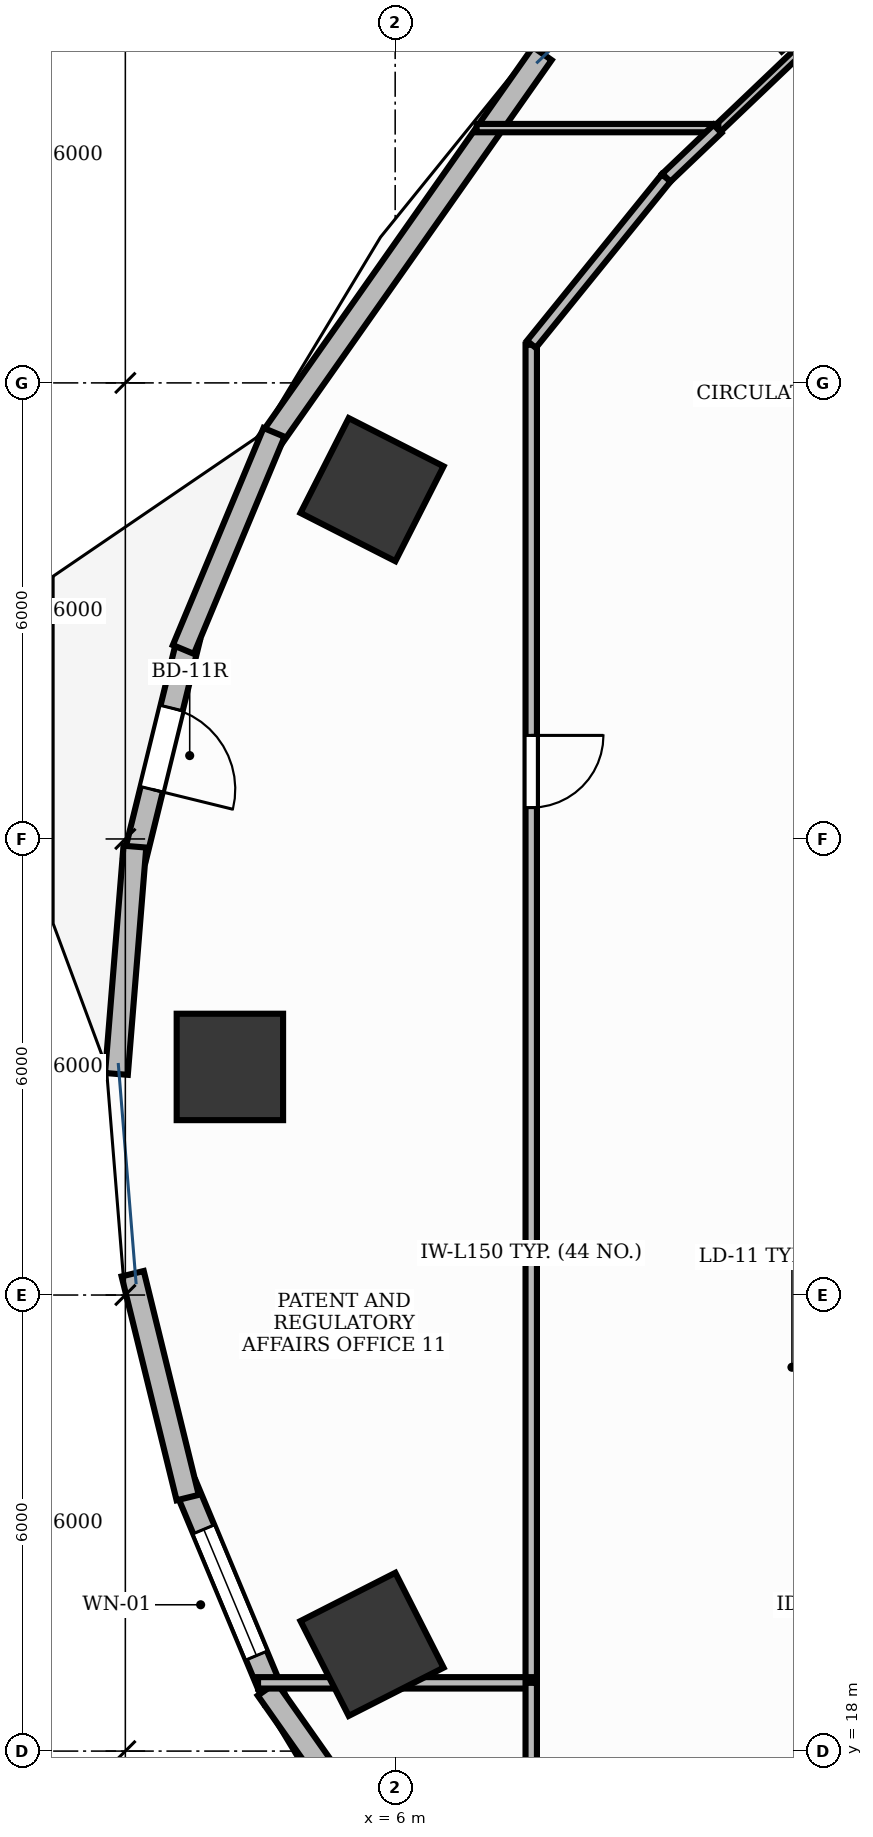
"""IFC4 building model, lengths in metres.
Left out: names, types, materials, properties, quantities, classifications, styles, units other than length and angle.
Written with IfcOpenShell. Run it as: python <this file> out.ifc"""

import sys

from ifc_helpers import new_model, si_unit, direction, frame, frame_2d, origin, origin_2d, place, context, subcontext, project, spatial, rectangle, extrude, element, fill, save


model = new_model("IFC4")
c1 = context("Model", 3, precision=1e-05, world=origin(), true_north=direction((0.0, 1.0)))
c2 = subcontext(c1, "Body", "Model", "MODEL_VIEW")
j1 = project(units=[si_unit("LENGTHUNIT", "METRE"), si_unit("PLANEANGLEUNIT", "RADIAN")], contexts=[c1])
p1 = place(None, origin())
s1 = spatial("IfcSite", under=j1, at=p1, CompositionType="ELEMENT")
p2 = place(p1, origin())
s2 = spatial("IfcBuilding", under=s1, at=p2, CompositionType="ELEMENT")
p3 = place(p2, frame((0.0, 0.0, 51.0)))
s3 = spatial("IfcBuildingStorey", under=s2, at=p3, CompositionType="ELEMENT", Elevation=51.0)
for number, where, z_axis, x_axis in (
    (1, (5.696, 34.596, -0.0), (0.0, 0.0, 1.0), (0.453, 0.891, 0.0)),
    (2, (3.825, 27.001, -0.0), (0.0, 0.0, 1.0), (0.0, 1.0, 0.0)),
    (3, (5.696, 19.404, -0.0), (0.0, 0.0, 1.0), (-0.453, 0.891, 0.0)),
):
    element("IfcColumn", number, at=place(p3, frame(where, z_axis=z_axis, x_axis=x_axis)), inside=s3, PredefinedType="COLUMN", context=c2, shape_type="SweptSolid", body=[
        extrude(rectangle(XDim=1.4, YDim=1.4, at=origin_2d()), origin(), (0.0, 0.0, 1.0), 3.901),
    ])
p4 = place(p3, frame((3.285, 32.641, 0.0), z_axis=(0.0, 0.0, 1.0), x_axis=(-0.238522035896, -0.971137085273, 0.0)))
e4 = element("IfcWall", 4, at=p4, inside=s3, PredefinedType="STANDARD", context=c2, shape_type="SweptSolid", body=[
    extrude(rectangle(XDim=2.993, YDim=0.3, at=frame_2d((1.497, 0.0))), origin(), (0.0, 0.0, 1.0), 3.9),
])
p5 = place(p4, frame((0.946, 0.0, 0.0)))
e5 = element("IfcOpeningElement", 5, at=p5, cuts=e4, PredefinedType="OPENING", context=c2, shape_type="SweptSolid", body=[
    extrude(rectangle(XDim=1.1, YDim=2.15, at=frame_2d((0.55, 1.075))), frame((0.0, 0.165, 0.0), z_axis=(0.0, -1.0, 0.0), x_axis=(1.0, 0.0, 0.0)), (0.0, 0.0, 1.0), 0.33),
])
p6 = place(p3, frame((3.24, 21.497, 0.0), z_axis=(0.0, 0.0, 1.0), x_axis=(0.385358473275, -0.92276695166, 0.0)))
e6 = element("IfcWall", 6, at=p6, inside=s3, PredefinedType="STANDARD", context=c2, shape_type="SweptSolid", body=[
    extrude(rectangle(XDim=3.056, YDim=0.3, at=frame_2d((1.528, 0.0))), origin(), (0.0, 0.0, 1.0), 3.47),
])
p7 = place(p6, frame((0.628, 0.0, 0.9)))
e7 = element("IfcOpeningElement", 7, at=p7, cuts=e6, PredefinedType="OPENING", context=c2, shape_type="SweptSolid", body=[
    extrude(rectangle(XDim=1.8, YDim=2.1, at=frame_2d((0.9, 1.05))), frame((0.0, 0.165, 0.0), z_axis=(0.0, -1.0, 0.0), x_axis=(1.0, 0.0, 0.0)), (0.0, 0.0, 1.0), 0.33),
])
p8 = place(p3, frame((7.936, 40.333, 0.0), z_axis=(0.0, 0.0, 1.0), x_axis=(-0.575165804445, -0.818036855769, 0.0)))
e8 = element("IfcWall", 8, at=p8, inside=s3, PredefinedType="STANDARD", context=c2, shape_type="SweptSolid", body=[
    extrude(rectangle(XDim=6.296, YDim=0.3, at=frame_2d((3.148, 0.0))), origin(), (0.0, 0.0, 1.0), 3.9),
])
p9 = place(p3, frame((4.406, 35.349, 0.0), z_axis=(0.0, 0.0, 1.0), x_axis=(-0.38535448421, -0.922768617531, 0.0)))
e9 = element("IfcWall", 9, at=p9, inside=s3, PredefinedType="STANDARD", context=c2, shape_type="SweptSolid", body=[
    extrude(rectangle(XDim=3.095, YDim=0.3, at=frame_2d((1.548, 0.0))), origin(), (0.0, 0.0, 1.0), 3.9),
])
p10 = place(p3, frame((2.576, 29.899, 0.0), z_axis=(0.0, 0.0, 1.0), x_axis=(-0.080890160317, -0.996723021689, 0.0)))
e10 = element("IfcWall", 10, at=p10, inside=s3, PredefinedType="STANDARD", context=c2, shape_type="SweptSolid", body=[
    extrude(rectangle(XDim=3.0, YDim=0.3, at=frame_2d((1.5, 0.0))), origin(), (0.0, 0.0, 1.0), 3.9),
])
p11 = place(p3, frame((2.546, 24.281, 0.0), z_axis=(0.0, 0.0, 1.0), x_axis=(0.23859399274, -0.971119409047, 0.0)))
e11 = element("IfcWall", 11, at=p11, inside=s3, PredefinedType="STANDARD", context=c2, shape_type="SweptSolid", body=[
    extrude(rectangle(XDim=3.033, YDim=0.3, at=frame_2d((1.517, 0.0))), origin(), (0.0, 0.0, 1.0), 3.47),
])
p12 = place(p3, frame((4.315, 18.817, 0.0), z_axis=(0.0, 0.0, 1.0), x_axis=(0.575165804445, -0.818036855769, 0.0)))
e12 = element("IfcWall", 12, at=p12, inside=s3, PredefinedType="STANDARD", context=c2, shape_type="SweptSolid", body=[
    extrude(rectangle(XDim=6.296, YDim=0.3, at=frame_2d((3.148, 0.0))), origin(), (0.0, 0.0, 1.0), 3.9),
])
p13 = place(p3, frame((7.79, 36.501, 0.0), z_axis=(0.0, 0.0, 1.0), x_axis=(0.0, -1.0, 0.0)))
e13 = element("IfcWall", 13, at=p13, inside=s3, PredefinedType="PARTITIONING", context=c2, shape_type="SweptSolid", body=[
    extrude(rectangle(XDim=17.593, YDim=0.15, at=frame_2d((8.797, 0.0))), origin(), (0.0, 0.0, 1.0), 2.91),
])
p14 = place(p13, frame((5.139, 0.0, 0.0)))
e14 = element("IfcOpeningElement", 14, at=p14, cuts=e13, PredefinedType="OPENING", context=c2, shape_type="SweptSolid", body=[
    extrude(rectangle(XDim=0.95, YDim=2.15, at=frame_2d((0.475, 1.075))), frame((0.0, 0.09, 0.0), z_axis=(0.0, -1.0, 0.0), x_axis=(1.0, 0.0, 0.0)), (0.0, 0.0, 1.0), 0.18),
])
p15 = place(p3, frame((4.196, 18.898, 0.0), z_axis=(0.0, 0.0, 1.0), x_axis=(1.0, 0.0, 0.0)))
e15 = element("IfcWall", 15, at=p15, inside=s3, PredefinedType="PARTITIONING", context=c2, shape_type="SweptSolid", body=[
    extrude(rectangle(XDim=3.594, YDim=0.15, at=frame_2d((1.797, 0.0))), origin(), (0.0, 0.0, 1.0), 2.91),
])
p16 = place(p3, frame((7.79, 18.898, 0.0), z_axis=(0.0, 0.0, 1.0), x_axis=(0.0, -1.0, 0.0)))
e16 = element("IfcWall", 16, at=p16, inside=s3, PredefinedType="PARTITIONING", context=c2, shape_type="SweptSolid", body=[
    extrude(rectangle(XDim=1.399, YDim=0.15, at=frame_2d((0.7, 0.0))), origin(), (0.0, 0.0, 1.0), 2.91),
])
p17 = place(p3, frame((11.693, 40.727, 0.0), z_axis=(0.0, 0.0, 1.0), x_axis=(-0.723636479822, -0.690181313185, 0.0)))
e17 = element("IfcWall", 17, at=p17, inside=s3, PredefinedType="MOVABLE", context=c2, shape_type="SweptSolid", body=[
    extrude(rectangle(XDim=1.992, YDim=0.11, at=frame_2d((0.996, 0.0))), origin(), (0.0, 0.0, 1.0), 2.91),
])
p18 = place(p3, frame((10.252, 39.352, 0.0), z_axis=(0.0, 0.0, 1.0), x_axis=(-1.0, 0.0, 0.0)))
e18 = element("IfcWall", 18, at=p18, inside=s3, PredefinedType="MOVABLE", context=c2, shape_type="SweptSolid", body=[
    extrude(rectangle(XDim=3.18, YDim=0.11, at=frame_2d((1.59, 0.0))), origin(), (0.0, 0.0, 1.0), 2.91),
])
p19 = place(p3, frame((10.241, 39.342, 0.0), z_axis=(0.0, 0.0, 1.0), x_axis=(-0.723783132033, -0.690027519585, 0.0)))
e19 = element("IfcWall", 19, at=p19, inside=s3, PredefinedType="PARTITIONING", context=c2, shape_type="SweptSolid", body=[
    extrude(rectangle(XDim=0.933, YDim=0.15, at=frame_2d((0.467, 0.0))), origin(), (0.0, 0.0, 1.0), 2.91),
])
p20 = place(p3, frame((9.565, 38.697, 0.0), z_axis=(0.0, 0.0, 1.0), x_axis=(-0.629270515505, -0.777186347227, 0.0)))
e20 = element("IfcWall", 20, at=p20, inside=s3, PredefinedType="PARTITIONING", context=c2, shape_type="SweptSolid", body=[
    extrude(rectangle(XDim=2.817, YDim=0.15, at=frame_2d((1.409, 0.0))), origin(), (0.0, 0.0, 1.0), 2.91),
])
p21 = place(p5, origin())
e21 = element("IfcDoor", 21, at=p21, inside=s3, OperationType="SINGLE_SWING_RIGHT", PredefinedType="DOOR", context=c2, shape_type="SweptSolid", body=[
    extrude(rectangle(XDim=1.1, YDim=2.15, at=frame_2d((0.55, 1.075))), frame((0.0, 0.025, 0.0), z_axis=(0.0, -1.0, 0.0), x_axis=(1.0, 0.0, 0.0)), (0.0, 0.0, 1.0), 0.05),
])
fill(e5, e21)
p22 = place(p7, origin())
e22 = element("IfcWindow", 22, at=p22, inside=s3, PartitioningType="SINGLE_PANEL", PredefinedType="WINDOW", context=c2, shape_type="SweptSolid", body=[
    extrude(rectangle(XDim=1.8, YDim=2.1, at=frame_2d((0.9, 1.05))), frame((0.0, 0.03, 0.0), z_axis=(0.0, -1.0, 0.0), x_axis=(1.0, 0.0, 0.0)), (0.0, 0.0, 1.0), 0.06),
])
fill(e7, e22)
p23 = place(p14, origin())
e23 = element("IfcDoor", 23, at=p23, inside=s3, OperationType="SINGLE_SWING_LEFT", PredefinedType="DOOR", context=c2, shape_type="SweptSolid", body=[
    extrude(rectangle(XDim=0.95, YDim=2.15, at=frame_2d((0.475, 1.075))), frame((0.0, 0.025, 0.0), z_axis=(0.0, -1.0, 0.0), x_axis=(1.0, 0.0, 0.0)), (0.0, 0.0, 1.0), 0.05),
])
fill(e14, e23)
save(model, sys.argv[1])
